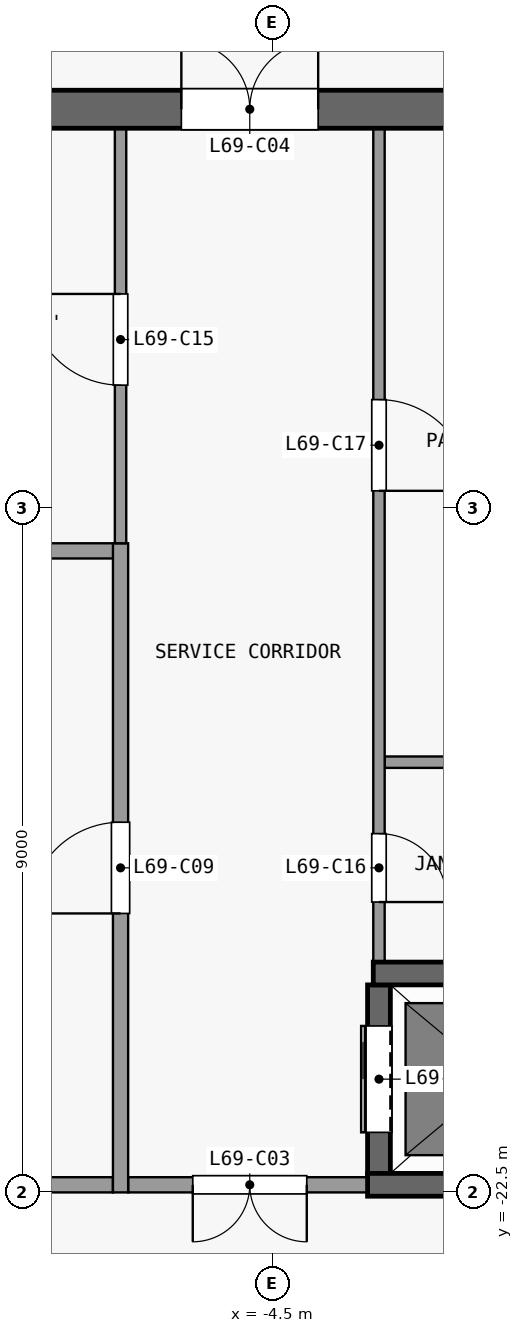
"""IFC4 building model, lengths in metres.
Left out: names, types, materials, properties, quantities, classifications, styles, units other than length and angle.
Written with IfcOpenShell. Run it as: python <this file> out.ifc"""

import sys

from ifc_helpers import new_model, si_unit, direction, frame, frame_2d, origin, place, context, subcontext, project, spatial, rectangle, extrude, element, fill, save


model = new_model("IFC4")
c1 = context("Model", 3, precision=1e-05, world=origin(), true_north=direction((0.0, 1.0)))
c2 = subcontext(c1, "Body", "Model", "MODEL_VIEW")
j1 = project(units=[si_unit("LENGTHUNIT", "METRE"), si_unit("PLANEANGLEUNIT", "RADIAN")], contexts=[c1])
p1 = place(None, origin())
s1 = spatial("IfcSite", under=j1, at=p1, CompositionType="ELEMENT")
p2 = place(p1, origin())
s2 = spatial("IfcBuilding", under=s1, at=p2, CompositionType="ELEMENT")
p3 = place(p2, frame((0.0, 0.0, 273.5)))
s3 = spatial("IfcBuildingStorey", under=s2, at=p3, CompositionType="ELEMENT", Elevation=273.5)
p4 = place(p3, frame((-13.1, -8.25, 0.0), z_axis=(0.0, 0.0, 1.0), x_axis=(1.0, 0.0, 0.0)))
e1 = element("IfcWall", 1, at=p4, inside=s3, PredefinedType="SHEAR", context=c2, shape_type="SweptSolid", body=[
    extrude(rectangle(XDim=26.2, YDim=0.5, at=frame_2d((13.1, 0.0))), origin(), (0.0, 0.0, 1.0), 3.3),
])
p5 = place(p4, frame((7.4, 0.0, 0.0)))
e2 = element("IfcOpeningElement", 2, at=p5, cuts=e1, PredefinedType="OPENING", context=c2, shape_type="SweptSolid", body=[
    extrude(rectangle(XDim=1.8, YDim=2.1, at=frame_2d((0.9, 1.05))), frame((0.0, 0.26, 0.0), z_axis=(0.0, -1.0, 0.0), x_axis=(1.0, 0.0, 0.0)), (0.0, 0.0, 1.0), 0.52),
])
p6 = place(p4, frame((17.0, 0.0, 0.0)))
e3 = element("IfcOpeningElement", 3, at=p6, cuts=e1, PredefinedType="OPENING", context=c2, shape_type="SweptSolid", body=[
    extrude(rectangle(XDim=1.8, YDim=2.1, at=frame_2d((0.9, 1.05))), frame((0.0, 0.26, 0.0), z_axis=(0.0, -1.0, 0.0), x_axis=(1.0, 0.0, 0.0)), (0.0, 0.0, 1.0), 0.52),
])
p7 = place(p4, frame((2.325, 0.0, 0.0)))
e4 = element("IfcOpeningElement", 4, at=p7, cuts=e1, PredefinedType="OPENING", context=c2, shape_type="SweptSolid", body=[
    extrude(rectangle(XDim=0.9, YDim=2.1, at=frame_2d((0.45, 1.05))), frame((0.0, 0.26, 0.0), z_axis=(0.0, -1.0, 0.0), x_axis=(1.0, 0.0, 0.0)), (0.0, 0.0, 1.0), 0.52),
])
p8 = place(p4, frame((22.975, 0.0, 0.0)))
e5 = element("IfcOpeningElement", 5, at=p8, cuts=e1, PredefinedType="OPENING", context=c2, shape_type="SweptSolid", body=[
    extrude(rectangle(XDim=0.9, YDim=2.1, at=frame_2d((0.45, 1.05))), frame((0.0, 0.26, 0.0), z_axis=(0.0, -1.0, 0.0), x_axis=(1.0, 0.0, 0.0)), (0.0, 0.0, 1.0), 0.52),
])
p9 = place(p3, frame((-9.45, -22.4, 0.0), z_axis=(0.0, 0.0, 1.0), x_axis=(1.0, 0.0, 0.0)))
e6 = element("IfcWall", 6, at=p9, inside=s3, PredefinedType="PARTITIONING", context=c2, shape_type="SweptSolid", body=[
    extrude(rectangle(XDim=2.85, YDim=0.2, at=frame_2d((1.425, 0.0))), origin(), (0.0, 0.0, 1.0), 3.3),
])
p10 = place(p3, frame((-3.25, -22.4, 0.0), z_axis=(0.0, 0.0, 1.0), x_axis=(-1.0, 0.0, 0.0)))
e7 = element("IfcWall", 7, at=p10, inside=s3, PredefinedType="PARTITIONING", context=c2, shape_type="SweptSolid", body=[
    extrude(rectangle(XDim=3.15, YDim=0.2, at=frame_2d((1.575, 0.0))), origin(), (0.0, 0.0, 1.0), 3.3),
])
p11 = place(p10, frame((0.8, 0.0, 0.0)))
e8 = element("IfcOpeningElement", 8, at=p11, cuts=e7, PredefinedType="OPENING", context=c2, shape_type="SweptSolid", body=[
    extrude(rectangle(XDim=1.5, YDim=2.1, at=frame_2d((0.75, 1.05))), frame((0.0, 0.11, 0.0), z_axis=(0.0, -1.0, 0.0), x_axis=(1.0, 0.0, 0.0)), (0.0, 0.0, 1.0), 0.22),
])
p12 = place(p3, frame((-3.25, -22.4, 0.0), z_axis=(0.0, 0.0, 1.0), x_axis=(1.0, 0.0, 0.0)))
e9 = element("IfcWall", 9, at=p12, inside=s3, PredefinedType="SHEAR", context=c2, shape_type="SweptSolid", body=[
    extrude(rectangle(XDim=6.5, YDim=0.3, at=frame_2d((3.25, 0.0))), origin(), (0.0, 0.0, 1.0), 3.3),
])
p13 = place(p3, frame((-3.175, -19.62, 0.0), z_axis=(0.0, 0.0, 1.0), x_axis=(1.0, 0.0, 0.0)))
e10 = element("IfcWall", 10, at=p13, inside=s3, PredefinedType="SHEAR", context=c2, shape_type="SweptSolid", body=[
    extrude(rectangle(XDim=3.025, YDim=0.3, at=frame_2d((1.513, 0.0))), origin(), (0.0, 0.0, 1.0), 3.3),
])
p14 = place(p3, frame((-3.025, -16.84, 0.0), z_axis=(0.0, 0.0, 1.0), x_axis=(1.0, 0.0, 0.0)))
e11 = element("IfcWall", 11, at=p14, inside=s3, PredefinedType="PARTITIONING", context=c2, shape_type="SweptSolid", body=[
    extrude(rectangle(XDim=2.925, YDim=0.15, at=frame_2d((1.462, 0.0))), origin(), (0.0, 0.0, 1.0), 3.3),
])
p15 = place(p3, frame((-9.5, -14.06, 0.0), z_axis=(0.0, 0.0, 1.0), x_axis=(1.0, 0.0, 0.0)))
e12 = element("IfcWall", 12, at=p15, inside=s3, PredefinedType="PARTITIONING", context=c2, shape_type="SweptSolid", body=[
    extrude(rectangle(XDim=3.075, YDim=0.2, at=frame_2d((1.538, 0.0))), origin(), (0.0, 0.0, 1.0), 3.3),
])
p16 = place(p3, frame((-6.5, -22.5, 0.0), z_axis=(0.0, 0.0, 1.0), x_axis=(0.0, 1.0, 0.0)))
e13 = element("IfcWall", 13, at=p16, inside=s3, PredefinedType="PARTITIONING", context=c2, shape_type="SweptSolid", body=[
    extrude(rectangle(XDim=8.54, YDim=0.2, at=frame_2d((4.27, 0.0))), origin(), (0.0, 0.0, 1.0), 3.3),
])
p17 = place(p16, frame((3.67, 0.0, 0.0)))
e14 = element("IfcOpeningElement", 14, at=p17, cuts=e13, PredefinedType="OPENING", context=c2, shape_type="SweptSolid", body=[
    extrude(rectangle(XDim=1.2, YDim=2.1, at=frame_2d((0.6, 1.05))), frame((0.0, 0.11, 0.0), z_axis=(0.0, -1.0, 0.0), x_axis=(1.0, 0.0, 0.0)), (0.0, 0.0, 1.0), 0.22),
])
p18 = place(p3, frame((-6.5, -13.96, 0.0), z_axis=(0.0, 0.0, 1.0), x_axis=(0.0, 1.0, 0.0)))
e15 = element("IfcWall", 15, at=p18, inside=s3, PredefinedType="PARTITIONING", context=c2, shape_type="SweptSolid", body=[
    extrude(rectangle(XDim=5.46, YDim=0.15, at=frame_2d((2.73, 0.0))), origin(), (0.0, 0.0, 1.0), 3.3),
])
p19 = place(p18, frame((2.08, 0.0, 0.0)))
e16 = element("IfcOpeningElement", 16, at=p19, cuts=e15, PredefinedType="OPENING", context=c2, shape_type="SweptSolid", body=[
    extrude(rectangle(XDim=1.2, YDim=2.1, at=frame_2d((0.6, 1.05))), frame((0.0, 0.085, 0.0), z_axis=(0.0, -1.0, 0.0), x_axis=(1.0, 0.0, 0.0)), (0.0, 0.0, 1.0), 0.17),
])
p20 = place(p3, frame((-3.1, -22.25, 0.0), z_axis=(0.0, 0.0, 1.0), x_axis=(0.0, 1.0, 0.0)))
e17 = element("IfcWall", 17, at=p20, inside=s3, PredefinedType="SHEAR", context=c2, shape_type="SweptSolid", body=[
    extrude(rectangle(XDim=2.48, YDim=0.3, at=frame_2d((1.24, 0.0))), origin(), (0.0, 0.0, 1.0), 3.3),
])
p21 = place(p20, frame((0.54, 0.0, 0.0)))
e18 = element("IfcOpeningElement", 18, at=p21, cuts=e17, PredefinedType="OPENING", context=c2, shape_type="SweptSolid", body=[
    extrude(rectangle(XDim=1.4, YDim=2.1, at=frame_2d((0.7, 1.05))), frame((0.0, 0.16, 0.0), z_axis=(0.0, -1.0, 0.0), x_axis=(1.0, 0.0, 0.0)), (0.0, 0.0, 1.0), 0.32),
])
p22 = place(p3, frame((-3.1, -8.5, 0.0), z_axis=(0.0, 0.0, 1.0), x_axis=(0.0, -1.0, 0.0)))
e19 = element("IfcWall", 19, at=p22, inside=s3, PredefinedType="PARTITIONING", context=c2, shape_type="SweptSolid", body=[
    extrude(rectangle(XDim=10.97, YDim=0.15, at=frame_2d((5.485, 0.0))), origin(), (0.0, 0.0, 1.0), 3.3),
])
p23 = place(p22, frame((9.28, 0.0, 0.0)))
e20 = element("IfcOpeningElement", 20, at=p23, cuts=e19, PredefinedType="OPENING", context=c2, shape_type="SweptSolid", body=[
    extrude(rectangle(XDim=0.9, YDim=2.1, at=frame_2d((0.45, 1.05))), frame((0.0, 0.085, 0.0), z_axis=(0.0, -1.0, 0.0), x_axis=(1.0, 0.0, 0.0)), (0.0, 0.0, 1.0), 0.17),
])
p24 = place(p22, frame((3.57, 0.0, 0.0)))
e21 = element("IfcOpeningElement", 21, at=p24, cuts=e19, PredefinedType="OPENING", context=c2, shape_type="SweptSolid", body=[
    extrude(rectangle(XDim=1.2, YDim=2.1, at=frame_2d((0.6, 1.05))), frame((0.0, 0.085, 0.0), z_axis=(0.0, -1.0, 0.0), x_axis=(1.0, 0.0, 0.0)), (0.0, 0.0, 1.0), 0.17),
])
p25 = place(p21, origin())
e22 = element("IfcDoor", 22, at=p25, inside=s3, OperationType="DOUBLE_DOOR_SLIDING", PredefinedType="DOOR", context=c2, shape_type="SweptSolid", body=[
    extrude(rectangle(XDim=1.4, YDim=2.1, at=frame_2d((0.7, 1.05))), frame((0.0, 0.025, 0.0), z_axis=(0.0, -1.0, 0.0), x_axis=(1.0, 0.0, 0.0)), (0.0, 0.0, 1.0), 0.05),
])
fill(e18, e22)
p26 = place(p11, origin())
e23 = element("IfcDoor", 23, at=p26, inside=s3, OperationType="DOUBLE_DOOR_SINGLE_SWING", PredefinedType="DOOR", context=c2, shape_type="SweptSolid", body=[
    extrude(rectangle(XDim=1.5, YDim=2.1, at=frame_2d((0.75, 1.05))), frame((0.0, 0.025, 0.0), z_axis=(0.0, -1.0, 0.0), x_axis=(1.0, 0.0, 0.0)), (0.0, 0.0, 1.0), 0.05),
])
fill(e8, e23)
p27 = place(p5, origin())
e24 = element("IfcDoor", 24, at=p27, inside=s3, OperationType="DOUBLE_DOOR_SINGLE_SWING", PredefinedType="DOOR", context=c2, shape_type="SweptSolid", body=[
    extrude(rectangle(XDim=1.8, YDim=2.1, at=frame_2d((0.9, 1.05))), frame((0.0, 0.025, 0.0), z_axis=(0.0, -1.0, 0.0), x_axis=(1.0, 0.0, 0.0)), (0.0, 0.0, 1.0), 0.05),
])
fill(e2, e24)
p28 = place(p17, origin())
e25 = element("IfcDoor", 25, at=p28, inside=s3, OperationType="SINGLE_SWING_LEFT", PredefinedType="DOOR", context=c2, shape_type="SweptSolid", body=[
    extrude(rectangle(XDim=1.2, YDim=2.1, at=frame_2d((0.6, 1.05))), frame((0.0, 0.025, 0.0), z_axis=(0.0, -1.0, 0.0), x_axis=(1.0, 0.0, 0.0)), (0.0, 0.0, 1.0), 0.05),
])
fill(e14, e25)
p29 = place(p19, origin())
e26 = element("IfcDoor", 26, at=p29, inside=s3, OperationType="SINGLE_SWING_RIGHT", PredefinedType="DOOR", context=c2, shape_type="SweptSolid", body=[
    extrude(rectangle(XDim=1.2, YDim=2.1, at=frame_2d((0.6, 1.05))), frame((0.0, 0.025, 0.0), z_axis=(0.0, -1.0, 0.0), x_axis=(1.0, 0.0, 0.0)), (0.0, 0.0, 1.0), 0.05),
])
fill(e16, e26)
p30 = place(p23, origin())
e27 = element("IfcDoor", 27, at=p30, inside=s3, OperationType="SINGLE_SWING_RIGHT", PredefinedType="DOOR", context=c2, shape_type="SweptSolid", body=[
    extrude(rectangle(XDim=0.9, YDim=2.1, at=frame_2d((0.45, 1.05))), frame((0.0, 0.025, 0.0), z_axis=(0.0, -1.0, 0.0), x_axis=(1.0, 0.0, 0.0)), (0.0, 0.0, 1.0), 0.05),
])
fill(e20, e27)
p31 = place(p24, origin())
e28 = element("IfcDoor", 28, at=p31, inside=s3, OperationType="SINGLE_SWING_RIGHT", PredefinedType="DOOR", context=c2, shape_type="SweptSolid", body=[
    extrude(rectangle(XDim=1.2, YDim=2.1, at=frame_2d((0.6, 1.05))), frame((0.0, 0.025, 0.0), z_axis=(0.0, -1.0, 0.0), x_axis=(1.0, 0.0, 0.0)), (0.0, 0.0, 1.0), 0.05),
])
fill(e21, e28)
save(model, sys.argv[1])
